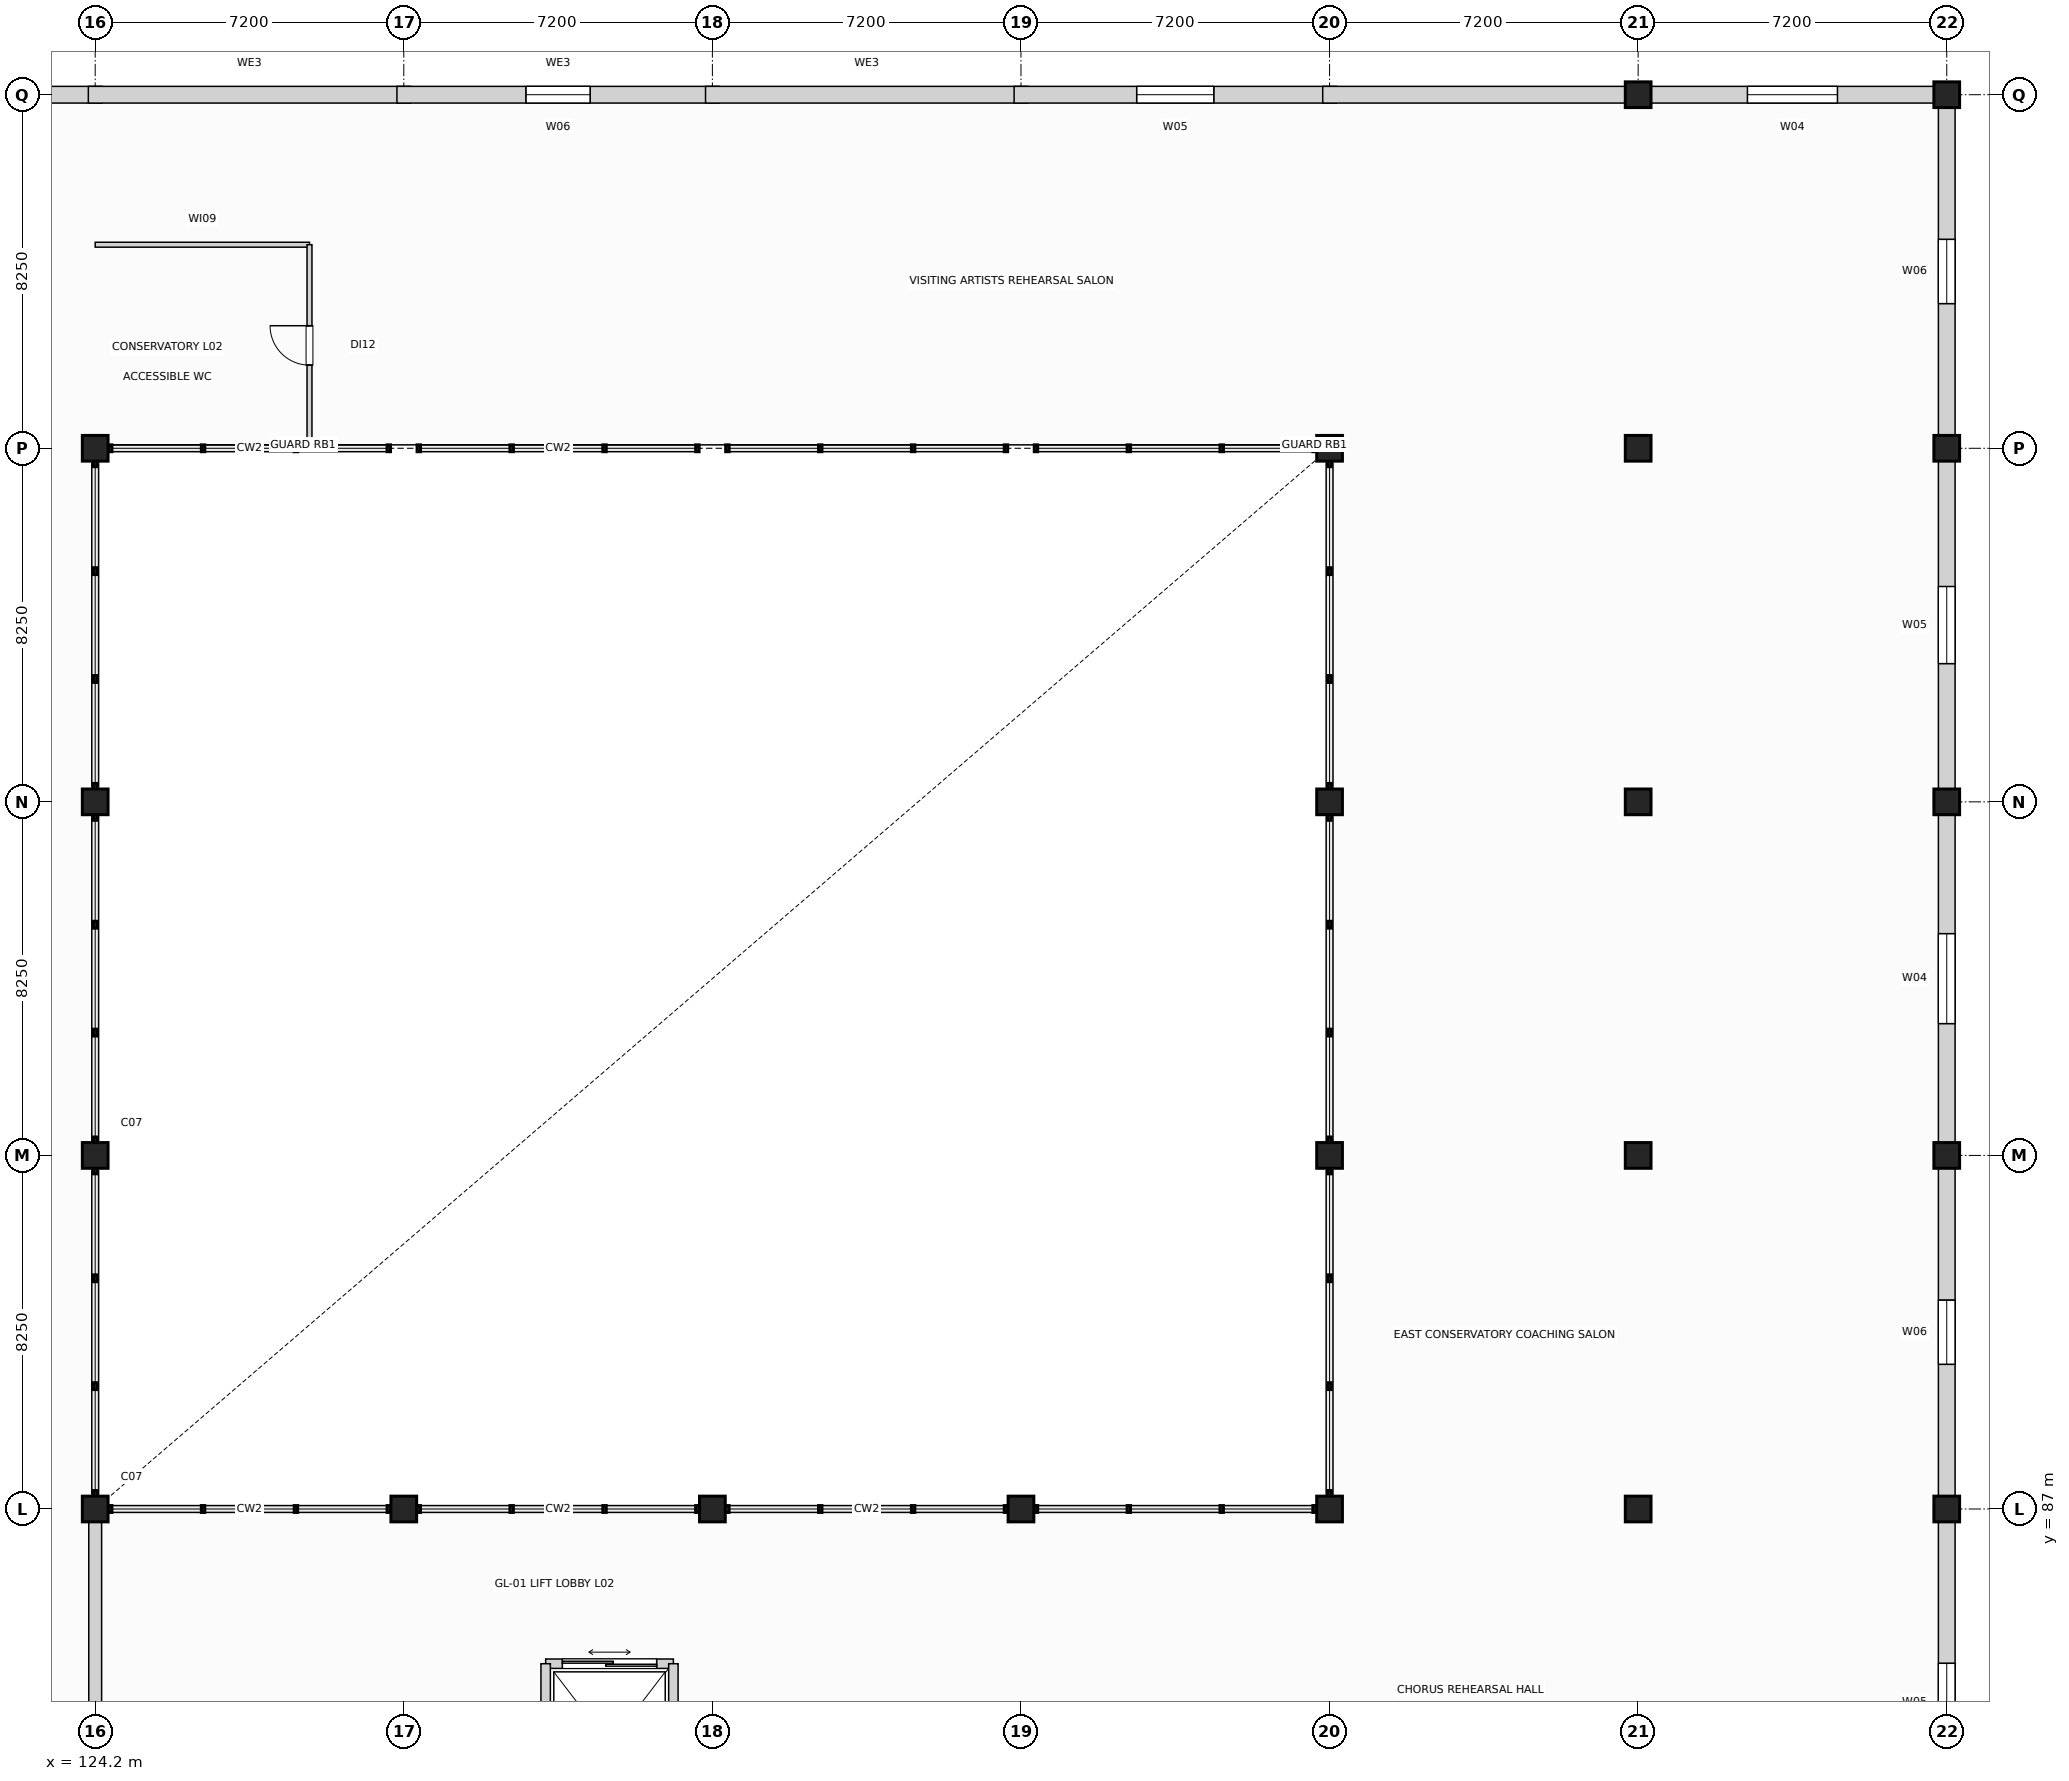
"""IFC4 building model, lengths in metres.
Left out: names, types, materials, properties, quantities, classifications, styles, units other than length and angle.
Written with IfcOpenShell. Run it as: python <this file> out.ifc"""

import sys

from ifc_helpers import new_model, si_unit, direction, frame, frame_2d, origin, origin_2d, place, context, subcontext, project, spatial, rectangle, extrude, element, fill, save


model = new_model("IFC4")
c1 = context("Model", 3, precision=1e-05, world=origin(), true_north=direction((0.0, 1.0)))
c2 = subcontext(c1, "Body", "Model", "MODEL_VIEW")
j1 = project(units=[si_unit("LENGTHUNIT", "METRE"), si_unit("PLANEANGLEUNIT", "RADIAN")], contexts=[c1])
p1 = place(None, origin())
s1 = spatial("IfcSite", under=j1, at=p1, CompositionType="ELEMENT")
p2 = place(p1, origin())
s2 = spatial("IfcBuilding", under=s1, at=p2, CompositionType="ELEMENT")
p3 = place(p2, frame((0.0, 0.0, 11.4)))
s3 = spatial("IfcBuildingStorey", under=s2, at=p3, CompositionType="ELEMENT", Elevation=11.4)
for number, where, z_axis, x_axis in (
    (1, (124.2, 87.0, 0.0), (0.0, 0.0, 1.0), (1.0, 0.0, 0.0)),
    (2, (124.2, 95.25, 0.0), (0.0, 0.0, 1.0), (1.0, 0.0, 0.0)),
    (3, (124.2, 103.5, 0.0), (0.0, 0.0, 1.0), (1.0, 0.0, 0.0)),
    (4, (124.2, 111.75, 0.0), (0.0, 0.0, 1.0), (1.0, 0.0, 0.0)),
    (5, (131.4, 87.0, 0.0), (0.0, 0.0, 1.0), (1.0, 0.0, 0.0)),
    (6, (138.6, 87.0, 0.0), (0.0, 0.0, 1.0), (1.0, 0.0, 0.0)),
    (7, (145.8, 87.0, 0.0), (0.0, 0.0, 1.0), (1.0, 0.0, 0.0)),
    (8, (153.0, 87.0, 0.0), (0.0, 0.0, 1.0), (1.0, 0.0, 0.0)),
    (9, (153.0, 95.25, 0.0), (0.0, 0.0, 1.0), (1.0, 0.0, 0.0)),
    (10, (153.0, 103.5, 0.0), (0.0, 0.0, 1.0), (1.0, 0.0, 0.0)),
    (11, (153.0, 111.75, 0.0), (0.0, 0.0, 1.0), (1.0, 0.0, 0.0)),
    (12, (160.2, 87.0, 0.0), (0.0, 0.0, 1.0), (1.0, 0.0, 0.0)),
    (13, (160.2, 95.25, 0.0), (0.0, 0.0, 1.0), (1.0, 0.0, 0.0)),
    (14, (160.2, 103.5, 0.0), (0.0, 0.0, 1.0), (1.0, 0.0, 0.0)),
    (15, (160.2, 111.75, 0.0), (0.0, 0.0, 1.0), (1.0, 0.0, 0.0)),
    (16, (160.2, 120.0, 0.0), (0.0, 0.0, 1.0), (1.0, 0.0, 0.0)),
    (17, (167.4, 87.0, 0.0), (0.0, 0.0, 1.0), (1.0, 0.0, 0.0)),
    (18, (167.4, 95.25, 0.0), (0.0, 0.0, 1.0), (1.0, 0.0, 0.0)),
    (19, (167.4, 103.5, 0.0), (0.0, 0.0, 1.0), (1.0, 0.0, 0.0)),
    (20, (167.4, 111.75, 0.0), (0.0, 0.0, 1.0), (1.0, 0.0, 0.0)),
    (21, (167.4, 120.0, 0.0), (0.0, 0.0, 1.0), (1.0, 0.0, 0.0)),
):
    element("IfcColumn", number, at=place(p3, frame(where, z_axis=z_axis, x_axis=x_axis)), inside=s3, PredefinedType="COLUMN", context=c2, shape_type="SweptSolid", body=[
        extrude(rectangle(XDim=0.6, YDim=0.6, at=origin_2d()), origin(), (0.0, 0.0, 1.0), 5.4),
    ])
p4 = place(p3, frame((116.84, 120.0, 0.0), z_axis=(0.0, 0.0, 1.0), x_axis=(1.0, 0.0, 0.0)))
e22 = element("IfcWall", 22, at=p4, inside=s3, PredefinedType="SOLIDWALL", context=c2, shape_type="SweptSolid", body=[
    extrude(rectangle(XDim=7.52, YDim=0.39, at=frame_2d((3.76, 0.0))), origin(), (0.0, 0.0, 1.0), 5.085),
])
p5 = place(p4, frame((2.71, 0.0, 0.9)))
e23 = element("IfcOpeningElement", 23, at=p5, cuts=e22, PredefinedType="OPENING", context=c2, shape_type="SweptSolid", body=[
    extrude(rectangle(XDim=2.1, YDim=2.5, at=frame_2d((1.05, 1.25))), frame((0.0, 0.205, 0.0), z_axis=(0.0, -1.0, 0.0), x_axis=(1.0, 0.0, 0.0)), (0.0, 0.0, 1.0), 0.41),
])
p6 = place(p3, frame((124.04, 120.0, 0.0), z_axis=(0.0, 0.0, 1.0), x_axis=(1.0, 0.0, 0.0)))
e24 = element("IfcWall", 24, at=p6, inside=s3, PredefinedType="SOLIDWALL", context=c2, shape_type="SweptSolid", body=[
    extrude(rectangle(XDim=7.52, YDim=0.39, at=frame_2d((3.76, 0.0))), origin(), (0.0, 0.0, 1.0), 5.085),
])
p7 = place(p3, frame((131.24, 120.0, 0.0), z_axis=(0.0, 0.0, 1.0), x_axis=(1.0, 0.0, 0.0)))
e25 = element("IfcWall", 25, at=p7, inside=s3, PredefinedType="SOLIDWALL", context=c2, shape_type="SweptSolid", body=[
    extrude(rectangle(XDim=7.52, YDim=0.39, at=frame_2d((3.76, 0.0))), origin(), (0.0, 0.0, 1.0), 5.085),
])
p8 = place(p7, frame((3.01, 0.0, 0.9)))
e26 = element("IfcOpeningElement", 26, at=p8, cuts=e25, PredefinedType="OPENING", context=c2, shape_type="SweptSolid", body=[
    extrude(rectangle(XDim=1.5, YDim=2.05, at=frame_2d((0.75, 1.025))), frame((0.0, 0.205, 0.0), z_axis=(0.0, -1.0, 0.0), x_axis=(1.0, 0.0, 0.0)), (0.0, 0.0, 1.0), 0.41),
])
p9 = place(p3, frame((138.44, 120.0, 0.0), z_axis=(0.0, 0.0, 1.0), x_axis=(1.0, 0.0, 0.0)))
e27 = element("IfcWall", 27, at=p9, inside=s3, PredefinedType="SOLIDWALL", context=c2, shape_type="SweptSolid", body=[
    extrude(rectangle(XDim=7.52, YDim=0.39, at=frame_2d((3.76, 0.0))), origin(), (0.0, 0.0, 1.0), 5.085),
])
p10 = place(p3, frame((145.64, 120.0, 0.0), z_axis=(0.0, 0.0, 1.0), x_axis=(1.0, 0.0, 0.0)))
e28 = element("IfcWall", 28, at=p10, inside=s3, PredefinedType="SOLIDWALL", context=c2, shape_type="SweptSolid", body=[
    extrude(rectangle(XDim=7.52, YDim=0.39, at=frame_2d((3.76, 0.0))), origin(), (0.0, 0.0, 1.0), 5.085),
])
p11 = place(p10, frame((2.86, 0.0, 0.9)))
e29 = element("IfcOpeningElement", 29, at=p11, cuts=e28, PredefinedType="OPENING", context=c2, shape_type="SweptSolid", body=[
    extrude(rectangle(XDim=1.8, YDim=2.3, at=frame_2d((0.9, 1.15))), frame((0.0, 0.205, 0.0), z_axis=(0.0, -1.0, 0.0), x_axis=(1.0, 0.0, 0.0)), (0.0, 0.0, 1.0), 0.41),
])
p12 = place(p3, frame((152.84, 120.0, 0.0), z_axis=(0.0, 0.0, 1.0), x_axis=(1.0, 0.0, 0.0)))
e30 = element("IfcWall", 30, at=p12, inside=s3, PredefinedType="SOLIDWALL", context=c2, shape_type="SweptSolid", body=[
    extrude(rectangle(XDim=7.065, YDim=0.39, at=frame_2d((3.532, 0.0))), origin(), (0.0, 0.0, 1.0), 4.545),
])
p13 = place(p3, frame((160.495, 120.0, 0.0), z_axis=(0.0, 0.0, 1.0), x_axis=(1.0, 0.0, 0.0)))
e31 = element("IfcWall", 31, at=p13, inside=s3, PredefinedType="SOLIDWALL", context=c2, shape_type="SweptSolid", body=[
    extrude(rectangle(XDim=6.61, YDim=0.39, at=frame_2d((3.305, 0.0))), origin(), (0.0, 0.0, 1.0), 4.545),
])
p14 = place(p13, frame((2.255, 0.0, 0.9)))
e32 = element("IfcOpeningElement", 32, at=p14, cuts=e31, PredefinedType="OPENING", context=c2, shape_type="SweptSolid", body=[
    extrude(rectangle(XDim=2.1, YDim=2.5, at=frame_2d((1.05, 1.25))), frame((0.0, 0.205, 0.0), z_axis=(0.0, -1.0, 0.0), x_axis=(1.0, 0.0, 0.0)), (0.0, 0.0, 1.0), 0.41),
])
p15 = place(p3, frame((167.4, 86.705, 0.0), z_axis=(0.0, 0.0, 1.0), x_axis=(0.0, -1.0, 0.0)))
e33 = element("IfcWall", 33, at=p15, inside=s3, PredefinedType="SOLIDWALL", context=c2, shape_type="SweptSolid", body=[
    extrude(rectangle(XDim=8.41, YDim=0.39, at=frame_2d((4.205, 0.0))), origin(), (0.0, 0.0, 1.0), 4.545),
])
p16 = place(p15, frame((3.305, 0.0, 0.9)))
e34 = element("IfcOpeningElement", 34, at=p16, cuts=e33, PredefinedType="OPENING", context=c2, shape_type="SweptSolid", body=[
    extrude(rectangle(XDim=1.8, YDim=2.3, at=frame_2d((0.9, 1.15))), frame((0.0, 0.205, 0.0), z_axis=(0.0, -1.0, 0.0), x_axis=(1.0, 0.0, 0.0)), (0.0, 0.0, 1.0), 0.41),
])
p17 = place(p3, frame((167.4, 94.955, 0.0), z_axis=(0.0, 0.0, 1.0), x_axis=(0.0, -1.0, 0.0)))
e35 = element("IfcWall", 35, at=p17, inside=s3, PredefinedType="SOLIDWALL", context=c2, shape_type="SweptSolid", body=[
    extrude(rectangle(XDim=7.66, YDim=0.39, at=frame_2d((3.83, 0.0))), origin(), (0.0, 0.0, 1.0), 4.535),
])
p18 = place(p17, frame((3.08, 0.0, 0.9)))
e36 = element("IfcOpeningElement", 36, at=p18, cuts=e35, PredefinedType="OPENING", context=c2, shape_type="SweptSolid", body=[
    extrude(rectangle(XDim=1.5, YDim=2.05, at=frame_2d((0.75, 1.025))), frame((0.0, 0.205, 0.0), z_axis=(0.0, -1.0, 0.0), x_axis=(1.0, 0.0, 0.0)), (0.0, 0.0, 1.0), 0.41),
])
p19 = place(p3, frame((167.4, 103.205, 0.0), z_axis=(0.0, 0.0, 1.0), x_axis=(0.0, -1.0, 0.0)))
e37 = element("IfcWall", 37, at=p19, inside=s3, PredefinedType="SOLIDWALL", context=c2, shape_type="SweptSolid", body=[
    extrude(rectangle(XDim=7.66, YDim=0.39, at=frame_2d((3.83, 0.0))), origin(), (0.0, 0.0, 1.0), 4.535),
])
p20 = place(p19, frame((2.78, 0.0, 0.9)))
e38 = element("IfcOpeningElement", 38, at=p20, cuts=e37, PredefinedType="OPENING", context=c2, shape_type="SweptSolid", body=[
    extrude(rectangle(XDim=2.1, YDim=2.5, at=frame_2d((1.05, 1.25))), frame((0.0, 0.205, 0.0), z_axis=(0.0, -1.0, 0.0), x_axis=(1.0, 0.0, 0.0)), (0.0, 0.0, 1.0), 0.41),
])
p21 = place(p3, frame((167.4, 111.455, 0.0), z_axis=(0.0, 0.0, 1.0), x_axis=(0.0, -1.0, 0.0)))
e39 = element("IfcWall", 39, at=p21, inside=s3, PredefinedType="SOLIDWALL", context=c2, shape_type="SweptSolid", body=[
    extrude(rectangle(XDim=7.66, YDim=0.39, at=frame_2d((3.83, 0.0))), origin(), (0.0, 0.0, 1.0), 4.585),
])
p22 = place(p21, frame((2.93, 0.0, 0.9)))
e40 = element("IfcOpeningElement", 40, at=p22, cuts=e39, PredefinedType="OPENING", context=c2, shape_type="SweptSolid", body=[
    extrude(rectangle(XDim=1.8, YDim=2.3, at=frame_2d((0.9, 1.15))), frame((0.0, 0.205, 0.0), z_axis=(0.0, -1.0, 0.0), x_axis=(1.0, 0.0, 0.0)), (0.0, 0.0, 1.0), 0.41),
])
p23 = place(p3, frame((167.4, 119.705, 0.0), z_axis=(0.0, 0.0, 1.0), x_axis=(0.0, -1.0, 0.0)))
e41 = element("IfcWall", 41, at=p23, inside=s3, PredefinedType="SOLIDWALL", context=c2, shape_type="SweptSolid", body=[
    extrude(rectangle(XDim=7.66, YDim=0.39, at=frame_2d((3.83, 0.0))), origin(), (0.0, 0.0, 1.0), 4.545),
])
p24 = place(p23, frame((3.08, 0.0, 0.9)))
e42 = element("IfcOpeningElement", 42, at=p24, cuts=e41, PredefinedType="OPENING", context=c2, shape_type="SweptSolid", body=[
    extrude(rectangle(XDim=1.5, YDim=2.05, at=frame_2d((0.75, 1.025))), frame((0.0, 0.205, 0.0), z_axis=(0.0, -1.0, 0.0), x_axis=(1.0, 0.0, 0.0)), (0.0, 0.0, 1.0), 0.41),
])
p25 = place(p3, frame((134.71, 83.39, 0.0), z_axis=(0.0, 0.0, 1.0), x_axis=(1.0, 0.0, 0.0)))
e43 = element("IfcWall", 43, at=p25, inside=s3, PredefinedType="PARTITIONING", context=c2, shape_type="SweptSolid", body=[
    extrude(rectangle(XDim=2.98, YDim=0.22, at=frame_2d((1.49, 0.0))), origin(), (0.0, 0.0, 1.0), 5.085),
])
p26 = place(p25, frame((0.39, 0.0, 0.0)))
e44 = element("IfcOpeningElement", 44, at=p26, cuts=e43, PredefinedType="OPENING", context=c2, shape_type="SweptSolid", body=[
    extrude(rectangle(XDim=2.2, YDim=2.5, at=frame_2d((1.1, 1.25))), frame((0.0, 0.12, 0.0), z_axis=(0.0, -1.0, 0.0), x_axis=(1.0, 0.0, 0.0)), (0.0, 0.0, 1.0), 0.24),
])
for number, where, z_axis, x_axis in (
    (45, (134.71, 79.61, 0.0), (0.0, 0.0, 1.0), (0.0, 1.0, 0.0)),
    (46, (137.69, 79.61, 0.0), (0.0, 0.0, 1.0), (0.0, 1.0, 0.0)),
):
    element("IfcWall", number, at=place(p3, frame(where, z_axis=z_axis, x_axis=x_axis)), inside=s3, PredefinedType="PARTITIONING", context=c2, shape_type="SweptSolid", body=[
        extrude(rectangle(XDim=3.78, YDim=0.22, at=frame_2d((1.89, 0.0))), origin(), (0.0, 0.0, 1.0), 5.085),
    ])
p27 = place(p3, frame((124.2, 69.2, 0.0), z_axis=(0.0, 0.0, 1.0), x_axis=(0.0, 1.0, 0.0)))
e47 = element("IfcWall", 47, at=p27, inside=s3, PredefinedType="PARTITIONING", context=c2, shape_type="SweptSolid", body=[
    extrude(rectangle(XDim=17.8, YDim=0.3, at=frame_2d((8.9, 0.0))), origin(), (0.0, 0.0, 1.0), 4.385),
])
p28 = place(p27, frame((6.156, 0.0, 0.0)))
e48 = element("IfcOpeningElement", 48, at=p28, cuts=e47, PredefinedType="OPENING", context=c2, shape_type="SweptSolid", body=[
    extrude(rectangle(XDim=1.6, YDim=2.25, at=frame_2d((0.8, 1.125))), frame((0.0, 0.16, 0.0), z_axis=(0.0, -1.0, 0.0), x_axis=(1.0, 0.0, 0.0)), (0.0, 0.0, 1.0), 0.32),
])
p29 = place(p3, frame((124.2, 116.5, 0.0), z_axis=(0.0, 0.0, 1.0), x_axis=(1.0, 0.0, 0.0)))
e49 = element("IfcWall", 49, at=p29, inside=s3, PredefinedType="PARTITIONING", context=c2, shape_type="SweptSolid", body=[
    extrude(rectangle(XDim=5.0, YDim=0.115, at=frame_2d((2.5, 0.0))), origin(), (0.0, 0.0, 1.0), 5.085),
])
p30 = place(p3, frame((129.2, 111.8, 0.0), z_axis=(0.0, 0.0, 1.0), x_axis=(0.0, 1.0, 0.0)))
e50 = element("IfcWall", 50, at=p30, inside=s3, PredefinedType="PARTITIONING", context=c2, shape_type="SweptSolid", body=[
    extrude(rectangle(XDim=4.7, YDim=0.115, at=frame_2d((2.35, 0.0))), origin(), (0.0, 0.0, 1.0), 5.085),
])
p31 = place(p30, frame((1.89, 0.0, 0.0)))
e51 = element("IfcOpeningElement", 51, at=p31, cuts=e50, PredefinedType="OPENING", context=c2, shape_type="SweptSolid", body=[
    extrude(rectangle(XDim=0.92, YDim=2.08, at=frame_2d((0.46, 1.04))), frame((0.0, 0.067, 0.0), z_axis=(0.0, -1.0, 0.0), x_axis=(1.0, 0.0, 0.0)), (0.0, 0.0, 1.0), 0.135),
])
p32 = place(p8, origin())
e52 = element("IfcWindow", 52, at=p32, inside=s3, PartitioningType="SINGLE_PANEL", PredefinedType="WINDOW", context=c2, shape_type="SweptSolid", body=[
    extrude(rectangle(XDim=1.5, YDim=2.05, at=frame_2d((0.75, 1.025))), frame((0.0, 0.03, 0.0), z_axis=(0.0, -1.0, 0.0), x_axis=(1.0, 0.0, 0.0)), (0.0, 0.0, 1.0), 0.06),
])
fill(e26, e52)
p33 = place(p11, origin())
e53 = element("IfcWindow", 53, at=p33, inside=s3, PartitioningType="SINGLE_PANEL", PredefinedType="WINDOW", context=c2, shape_type="SweptSolid", body=[
    extrude(rectangle(XDim=1.8, YDim=2.3, at=frame_2d((0.9, 1.15))), frame((0.0, 0.03, 0.0), z_axis=(0.0, -1.0, 0.0), x_axis=(1.0, 0.0, 0.0)), (0.0, 0.0, 1.0), 0.06),
])
fill(e29, e53)
p34 = place(p14, origin())
e54 = element("IfcWindow", 54, at=p34, inside=s3, PartitioningType="SINGLE_PANEL", PredefinedType="WINDOW", context=c2, shape_type="SweptSolid", body=[
    extrude(rectangle(XDim=2.1, YDim=2.5, at=frame_2d((1.05, 1.25))), frame((0.0, 0.03, 0.0), z_axis=(0.0, -1.0, 0.0), x_axis=(1.0, 0.0, 0.0)), (0.0, 0.0, 1.0), 0.06),
])
fill(e32, e54)
p35 = place(p16, origin())
e55 = element("IfcWindow", 55, at=p35, inside=s3, PartitioningType="SINGLE_PANEL", PredefinedType="WINDOW", context=c2, shape_type="SweptSolid", body=[
    extrude(rectangle(XDim=1.8, YDim=2.3, at=frame_2d((0.9, 1.15))), frame((0.0, 0.03, 0.0), z_axis=(0.0, -1.0, 0.0), x_axis=(1.0, 0.0, 0.0)), (0.0, 0.0, 1.0), 0.06),
])
fill(e34, e55)
p36 = place(p18, origin())
e56 = element("IfcWindow", 56, at=p36, inside=s3, PartitioningType="SINGLE_PANEL", PredefinedType="WINDOW", context=c2, shape_type="SweptSolid", body=[
    extrude(rectangle(XDim=1.5, YDim=2.05, at=frame_2d((0.75, 1.025))), frame((0.0, 0.03, 0.0), z_axis=(0.0, -1.0, 0.0), x_axis=(1.0, 0.0, 0.0)), (0.0, 0.0, 1.0), 0.06),
])
fill(e36, e56)
p37 = place(p20, origin())
e57 = element("IfcWindow", 57, at=p37, inside=s3, PartitioningType="SINGLE_PANEL", PredefinedType="WINDOW", context=c2, shape_type="SweptSolid", body=[
    extrude(rectangle(XDim=2.1, YDim=2.5, at=frame_2d((1.05, 1.25))), frame((0.0, 0.03, 0.0), z_axis=(0.0, -1.0, 0.0), x_axis=(1.0, 0.0, 0.0)), (0.0, 0.0, 1.0), 0.06),
])
fill(e38, e57)
p38 = place(p22, origin())
e58 = element("IfcWindow", 58, at=p38, inside=s3, PartitioningType="SINGLE_PANEL", PredefinedType="WINDOW", context=c2, shape_type="SweptSolid", body=[
    extrude(rectangle(XDim=1.8, YDim=2.3, at=frame_2d((0.9, 1.15))), frame((0.0, 0.03, 0.0), z_axis=(0.0, -1.0, 0.0), x_axis=(1.0, 0.0, 0.0)), (0.0, 0.0, 1.0), 0.06),
])
fill(e40, e58)
p39 = place(p24, origin())
e59 = element("IfcWindow", 59, at=p39, inside=s3, PartitioningType="SINGLE_PANEL", PredefinedType="WINDOW", context=c2, shape_type="SweptSolid", body=[
    extrude(rectangle(XDim=1.5, YDim=2.05, at=frame_2d((0.75, 1.025))), frame((0.0, 0.03, 0.0), z_axis=(0.0, -1.0, 0.0), x_axis=(1.0, 0.0, 0.0)), (0.0, 0.0, 1.0), 0.06),
])
fill(e42, e59)
p40 = place(p26, origin())
e60 = element("IfcDoor", 60, at=p40, inside=s3, OperationType="DOUBLE_DOOR_SLIDING", PredefinedType="DOOR", context=c2, shape_type="SweptSolid", body=[
    extrude(rectangle(XDim=2.2, YDim=2.5, at=frame_2d((1.1, 1.25))), frame((0.0, 0.025, 0.0), z_axis=(0.0, -1.0, 0.0), x_axis=(1.0, 0.0, 0.0)), (0.0, 0.0, 1.0), 0.05),
])
fill(e44, e60)
p41 = place(p31, origin())
e61 = element("IfcDoor", 61, at=p41, inside=s3, OperationType="SINGLE_SWING_RIGHT", PredefinedType="DOOR", context=c2, shape_type="SweptSolid", body=[
    extrude(rectangle(XDim=0.92, YDim=2.08, at=frame_2d((0.46, 1.04))), frame((0.0, 0.025, 0.0), z_axis=(0.0, -1.0, 0.0), x_axis=(1.0, 0.0, 0.0)), (0.0, 0.0, 1.0), 0.05),
])
fill(e51, e61)
save(model, sys.argv[1])
